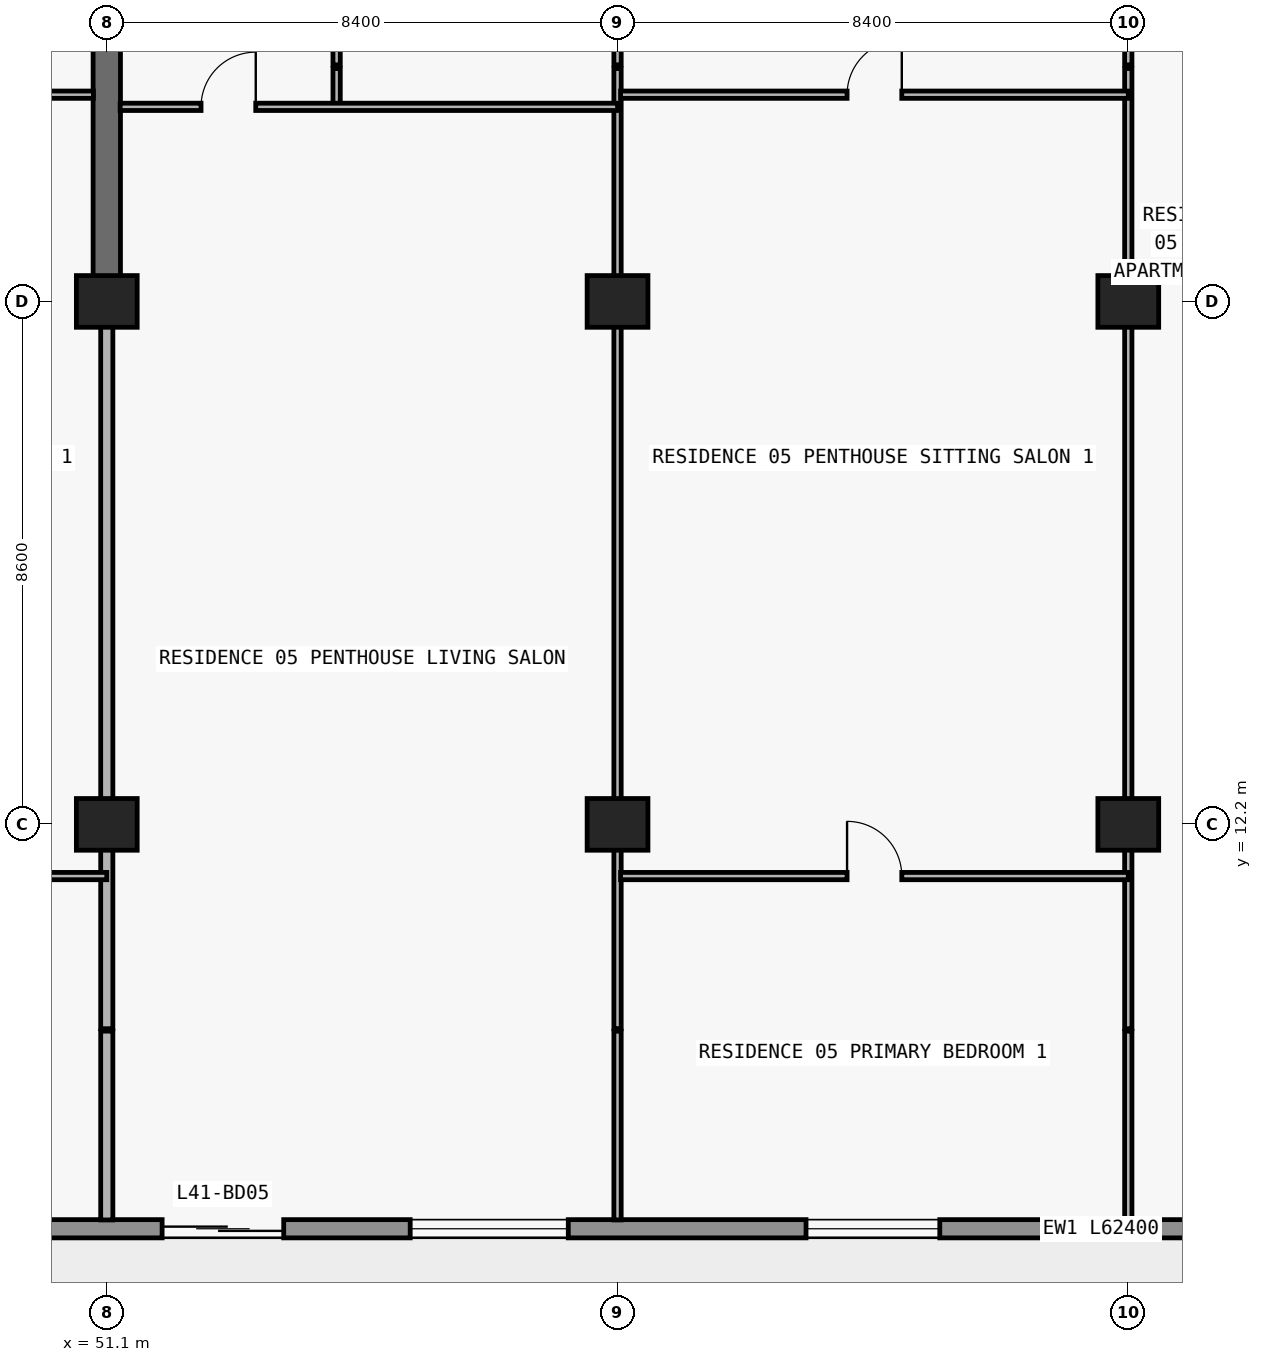
"""IFC4 building model, lengths in metres.
Left out: names, types, materials, properties, quantities, classifications, styles, units other than length and angle.
Written with IfcOpenShell. Run it as: python <this file> out.ifc"""

import sys

from ifc_helpers import new_model, si_unit, direction, frame, frame_2d, origin, origin_2d, place, context, subcontext, project, spatial, rectangle, extrude, element, fill, save


model = new_model("IFC4")
c1 = context("Model", 3, precision=1e-05, world=origin(), true_north=direction((0.0, 1.0)))
c2 = subcontext(c1, "Body", "Model", "MODEL_VIEW")
j1 = project(units=[si_unit("LENGTHUNIT", "METRE"), si_unit("PLANEANGLEUNIT", "RADIAN")], contexts=[c1])
p1 = place(None, origin())
s1 = spatial("IfcSite", under=j1, at=p1, CompositionType="ELEMENT")
p2 = place(p1, origin())
s2 = spatial("IfcBuilding", under=s1, at=p2, CompositionType="ELEMENT")
p3 = place(p2, frame((0.0, 0.0, 148.8)))
s3 = spatial("IfcBuildingStorey", under=s2, at=p3, CompositionType="ELEMENT", Elevation=148.8)
for number, where, z_axis, x_axis in (
    (1, (51.1, 12.2, 0.0), (0.0, 0.0, 1.0), (1.0, 0.0, 0.0)),
    (2, (59.5, 12.2, 0.0), (0.0, 0.0, 1.0), (1.0, 0.0, 0.0)),
    (3, (67.9, 12.2, 0.0), (0.0, 0.0, 1.0), (1.0, 0.0, 0.0)),
    (4, (51.1, 20.8, 0.0), (0.0, 0.0, 1.0), (1.0, 0.0, 0.0)),
    (5, (59.5, 20.8, 0.0), (0.0, 0.0, 1.0), (1.0, 0.0, 0.0)),
    (6, (67.9, 20.8, 0.0), (0.0, 0.0, 1.0), (1.0, 0.0, 0.0)),
):
    element("IfcColumn", number, at=place(p3, frame(where, z_axis=z_axis, x_axis=x_axis)), inside=s3, PredefinedType="COLUMN", context=c2, shape_type="SweptSolid", body=[
        extrude(rectangle(XDim=1.0, YDim=0.85, at=origin_2d()), origin(), (0.0, 0.0, 1.0), 3.0),
    ])
p4 = place(p3, frame((51.1, 20.8, 0.0), z_axis=(0.0, 0.0, 1.0), x_axis=(0.0, 1.0, 0.0)))
e7 = element("IfcWall", 7, at=p4, inside=s3, PredefinedType="SHEAR", context=c2, shape_type="SweptSolid", body=[
    extrude(rectangle(XDim=8.6, YDim=0.45, at=frame_2d((4.3, 0.0))), origin(), (0.0, 0.0, 1.0), 3.0),
])
p5 = place(p3, frame((70.1, 5.55, 0.0), z_axis=(0.0, 0.0, 1.0), x_axis=(-1.0, 0.0, 0.0)))
e8 = element("IfcWall", 8, at=p5, inside=s3, PredefinedType="STANDARD", context=c2, shape_type="SweptSolid", body=[
    extrude(rectangle(XDim=62.4, YDim=0.3, at=frame_2d((31.2, 0.0))), origin(), (0.0, 0.0, 1.0), 3.0),
])
p6 = place(p5, frame((57.226, 0.0, 0.0)))
e9 = element("IfcOpeningElement", 9, at=p6, cuts=e8, PredefinedType="OPENING", context=c2, shape_type="SweptSolid", body=[
    extrude(rectangle(XDim=2.0, YDim=2.3, at=frame_2d((1.0, 1.15))), frame((0.0, 0.16, 0.0), z_axis=(0.0, -1.0, 0.0), x_axis=(1.0, 0.0, 0.0)), (0.0, 0.0, 1.0), 0.32),
])
p7 = place(p5, frame((52.926, 0.0, 0.85)))
e10 = element("IfcOpeningElement", 10, at=p7, cuts=e8, PredefinedType="OPENING", context=c2, shape_type="SweptSolid", body=[
    extrude(rectangle(XDim=2.2, YDim=1.55, at=frame_2d((1.1, 0.775))), frame((0.0, 0.16, 0.0), z_axis=(0.0, -1.0, 0.0), x_axis=(1.0, 0.0, 0.0)), (0.0, 0.0, 1.0), 0.32),
])
p8 = place(p5, frame((48.49, 0.0, 0.0)))
e11 = element("IfcOpeningElement", 11, at=p8, cuts=e8, PredefinedType="OPENING", context=c2, shape_type="SweptSolid", body=[
    extrude(rectangle(XDim=2.0, YDim=2.3, at=frame_2d((1.0, 1.15))), frame((0.0, 0.16, 0.0), z_axis=(0.0, -1.0, 0.0), x_axis=(1.0, 0.0, 0.0)), (0.0, 0.0, 1.0), 0.32),
])
p9 = place(p5, frame((44.39, 0.0, 0.85)))
e12 = element("IfcOpeningElement", 12, at=p9, cuts=e8, PredefinedType="OPENING", context=c2, shape_type="SweptSolid", body=[
    extrude(rectangle(XDim=1.8, YDim=1.55, at=frame_2d((0.9, 0.775))), frame((0.0, 0.16, 0.0), z_axis=(0.0, -1.0, 0.0), x_axis=(1.0, 0.0, 0.0)), (0.0, 0.0, 1.0), 0.32),
])
p10 = place(p5, frame((40.426, 0.0, 0.0)))
e13 = element("IfcOpeningElement", 13, at=p10, cuts=e8, PredefinedType="OPENING", context=c2, shape_type="SweptSolid", body=[
    extrude(rectangle(XDim=2.0, YDim=2.3, at=frame_2d((1.0, 1.15))), frame((0.0, 0.16, 0.0), z_axis=(0.0, -1.0, 0.0), x_axis=(1.0, 0.0, 0.0)), (0.0, 0.0, 1.0), 0.32),
])
p11 = place(p5, frame((36.126, 0.0, 0.85)))
e14 = element("IfcOpeningElement", 14, at=p11, cuts=e8, PredefinedType="OPENING", context=c2, shape_type="SweptSolid", body=[
    extrude(rectangle(XDim=2.2, YDim=1.55, at=frame_2d((1.1, 0.775))), frame((0.0, 0.16, 0.0), z_axis=(0.0, -1.0, 0.0), x_axis=(1.0, 0.0, 0.0)), (0.0, 0.0, 1.0), 0.32),
])
p12 = place(p5, frame((32.09, 0.0, 0.0)))
e15 = element("IfcOpeningElement", 15, at=p12, cuts=e8, PredefinedType="OPENING", context=c2, shape_type="SweptSolid", body=[
    extrude(rectangle(XDim=2.0, YDim=2.3, at=frame_2d((1.0, 1.15))), frame((0.0, 0.16, 0.0), z_axis=(0.0, -1.0, 0.0), x_axis=(1.0, 0.0, 0.0)), (0.0, 0.0, 1.0), 0.32),
])
p13 = place(p5, frame((28.21, 0.0, 0.65)))
e16 = element("IfcOpeningElement", 16, at=p13, cuts=e8, PredefinedType="OPENING", context=c2, shape_type="SweptSolid", body=[
    extrude(rectangle(XDim=2.6, YDim=1.85, at=frame_2d((1.3, 0.925))), frame((0.0, 0.16, 0.0), z_axis=(0.0, -1.0, 0.0), x_axis=(1.0, 0.0, 0.0)), (0.0, 0.0, 1.0), 0.32),
])
p14 = place(p5, frame((22.1, 0.0, 0.85)))
e17 = element("IfcOpeningElement", 17, at=p14, cuts=e8, PredefinedType="OPENING", context=c2, shape_type="SweptSolid", body=[
    extrude(rectangle(XDim=2.2, YDim=1.55, at=frame_2d((1.1, 0.775))), frame((0.0, 0.16, 0.0), z_axis=(0.0, -1.0, 0.0), x_axis=(1.0, 0.0, 0.0)), (0.0, 0.0, 1.0), 0.32),
])
p15 = place(p5, frame((16.09, 0.0, 0.0)))
e18 = element("IfcOpeningElement", 18, at=p15, cuts=e8, PredefinedType="OPENING", context=c2, shape_type="SweptSolid", body=[
    extrude(rectangle(XDim=2.0, YDim=2.3, at=frame_2d((1.0, 1.15))), frame((0.0, 0.16, 0.0), z_axis=(0.0, -1.0, 0.0), x_axis=(1.0, 0.0, 0.0)), (0.0, 0.0, 1.0), 0.32),
])
p16 = place(p5, frame((11.41, 0.0, 0.65)))
e19 = element("IfcOpeningElement", 19, at=p16, cuts=e8, PredefinedType="OPENING", context=c2, shape_type="SweptSolid", body=[
    extrude(rectangle(XDim=2.6, YDim=1.85, at=frame_2d((1.3, 0.925))), frame((0.0, 0.16, 0.0), z_axis=(0.0, -1.0, 0.0), x_axis=(1.0, 0.0, 0.0)), (0.0, 0.0, 1.0), 0.32),
])
p17 = place(p5, frame((5.3, 0.0, 0.85)))
e20 = element("IfcOpeningElement", 20, at=p17, cuts=e8, PredefinedType="OPENING", context=c2, shape_type="SweptSolid", body=[
    extrude(rectangle(XDim=2.2, YDim=1.55, at=frame_2d((1.1, 0.775))), frame((0.0, 0.16, 0.0), z_axis=(0.0, -1.0, 0.0), x_axis=(1.0, 0.0, 0.0)), (0.0, 0.0, 1.0), 0.32),
])
p18 = place(p3, frame((51.1, 5.695, 0.0), z_axis=(0.0, 0.0, 1.0), x_axis=(0.0, 1.0, 0.0)))
e21 = element("IfcWall", 21, at=p18, inside=s3, PredefinedType="PARTITIONING", context=c2, shape_type="SweptSolid", body=[
    extrude(rectangle(XDim=3.105, YDim=0.2, at=frame_2d((1.552, 0.0))), origin(), (0.0, 0.0, 1.0), 3.0),
])
p19 = place(p3, frame((51.1, 8.84, 0.0), z_axis=(0.0, 0.0, 1.0), x_axis=(0.0, 1.0, 0.0)))
e22 = element("IfcWall", 22, at=p19, inside=s3, PredefinedType="PARTITIONING", context=c2, shape_type="SweptSolid", body=[
    extrude(rectangle(XDim=11.955, YDim=0.2, at=frame_2d((5.978, 0.0))), origin(), (0.0, 0.0, 1.0), 2.124),
])
p20 = place(p3, frame((54.88, 24.0, 0.0), z_axis=(0.0, 0.0, 1.0), x_axis=(0.0, 1.0, 0.0)))
e23 = element("IfcWall", 23, at=p20, inside=s3, PredefinedType="PARTITIONING", context=c2, shape_type="SweptSolid", body=[
    extrude(rectangle(XDim=0.63, YDim=0.12, at=frame_2d((0.315, 0.0))), origin(), (0.0, 0.0, 1.0), 3.0),
])
p21 = place(p3, frame((54.88, 24.69, 0.0), z_axis=(0.0, 0.0, 1.0), x_axis=(0.0, 1.0, 0.0)))
e24 = element("IfcWall", 24, at=p21, inside=s3, PredefinedType="PARTITIONING", context=c2, shape_type="SweptSolid", body=[
    extrude(rectangle(XDim=4.11, YDim=0.12, at=frame_2d((2.055, 0.0))), origin(), (0.0, 0.0, 1.0), 3.0),
])
p22 = place(p21, frame((1.605, 0.0, 0.0)))
e25 = element("IfcOpeningElement", 25, at=p22, cuts=e24, PredefinedType="OPENING", context=c2, shape_type="SweptSolid", body=[
    extrude(rectangle(XDim=0.9, YDim=2.15, at=frame_2d((0.45, 1.075))), frame((0.0, 0.07, 0.0), z_axis=(0.0, -1.0, 0.0), x_axis=(1.0, 0.0, 0.0)), (0.0, 0.0, 1.0), 0.14),
])
p23 = place(p3, frame((59.5, 5.695, 0.0), z_axis=(0.0, 0.0, 1.0), x_axis=(0.0, 1.0, 0.0)))
e26 = element("IfcWall", 26, at=p23, inside=s3, PredefinedType="PARTITIONING", context=c2, shape_type="SweptSolid", body=[
    extrude(rectangle(XDim=3.105, YDim=0.12, at=frame_2d((1.552, 0.0))), origin(), (0.0, 0.0, 1.0), 3.0),
])
p24 = place(p3, frame((59.5, 8.84, 0.0), z_axis=(0.0, 0.0, 1.0), x_axis=(0.0, 1.0, 0.0)))
e27 = element("IfcWall", 27, at=p24, inside=s3, PredefinedType="PARTITIONING", context=c2, shape_type="SweptSolid", body=[
    extrude(rectangle(XDim=15.79, YDim=0.12, at=frame_2d((7.895, 0.0))), origin(), (0.0, 0.0, 1.0), 2.124),
])
p25 = place(p3, frame((59.5, 24.69, 0.0), z_axis=(0.0, 0.0, 1.0), x_axis=(0.0, 1.0, 0.0)))
e28 = element("IfcWall", 28, at=p25, inside=s3, PredefinedType="PARTITIONING", context=c2, shape_type="SweptSolid", body=[
    extrude(rectangle(XDim=5.09, YDim=0.12, at=frame_2d((2.545, 0.0))), origin(), (0.0, 0.0, 1.0), 2.124),
])
p26 = place(p25, frame((1.505, 0.0, 0.0)))
e29 = element("IfcOpeningElement", 29, at=p26, cuts=e28, PredefinedType="OPENING", context=c2, shape_type="SweptSolid", body=[
    extrude(rectangle(XDim=0.9, YDim=2.074, at=frame_2d((0.45, 1.037))), frame((0.0, 0.07, 0.0), z_axis=(0.0, -1.0, 0.0), x_axis=(1.0, 0.0, 0.0)), (0.0, 0.0, 1.0), 0.14),
])
p27 = place(p3, frame((67.9, 5.695, 0.0), z_axis=(0.0, 0.0, 1.0), x_axis=(0.0, 1.0, 0.0)))
e30 = element("IfcWall", 30, at=p27, inside=s3, PredefinedType="PARTITIONING", context=c2, shape_type="SweptSolid", body=[
    extrude(rectangle(XDim=3.105, YDim=0.12, at=frame_2d((1.552, 0.0))), origin(), (0.0, 0.0, 1.0), 3.0),
])
p28 = place(p3, frame((67.9, 8.84, 0.0), z_axis=(0.0, 0.0, 1.0), x_axis=(0.0, 1.0, 0.0)))
e31 = element("IfcWall", 31, at=p28, inside=s3, PredefinedType="PARTITIONING", context=c2, shape_type="SweptSolid", body=[
    extrude(rectangle(XDim=15.79, YDim=0.12, at=frame_2d((7.895, 0.0))), origin(), (0.0, 0.0, 1.0), 2.124),
])
p29 = place(p3, frame((67.9, 24.69, 0.0), z_axis=(0.0, 0.0, 1.0), x_axis=(0.0, 1.0, 0.0)))
e32 = element("IfcWall", 32, at=p29, inside=s3, PredefinedType="PARTITIONING", context=c2, shape_type="SweptSolid", body=[
    extrude(rectangle(XDim=5.09, YDim=0.12, at=frame_2d((2.545, 0.0))), origin(), (0.0, 0.0, 1.0), 2.124),
])
p30 = place(p29, frame((1.505, 0.0, 0.0)))
e33 = element("IfcOpeningElement", 33, at=p30, cuts=e32, PredefinedType="OPENING", context=c2, shape_type="SweptSolid", body=[
    extrude(rectangle(XDim=0.9, YDim=2.074, at=frame_2d((0.45, 1.037))), frame((0.0, 0.07, 0.0), z_axis=(0.0, -1.0, 0.0), x_axis=(1.0, 0.0, 0.0)), (0.0, 0.0, 1.0), 0.14),
])
p31 = place(p3, frame((42.7, 11.35, 0.0), z_axis=(0.0, 0.0, 1.0), x_axis=(1.0, 0.0, 0.0)))
e34 = element("IfcWall", 34, at=p31, inside=s3, PredefinedType="PARTITIONING", context=c2, shape_type="SweptSolid", body=[
    extrude(rectangle(XDim=8.4, YDim=0.12, at=frame_2d((4.2, 0.0))), origin(), (0.0, 0.0, 1.0), 3.0),
])
p32 = place(p31, frame((3.75, 0.0, 0.0)))
e35 = element("IfcOpeningElement", 35, at=p32, cuts=e34, PredefinedType="OPENING", context=c2, shape_type="SweptSolid", body=[
    extrude(rectangle(XDim=0.9, YDim=2.15, at=frame_2d((0.45, 1.075))), frame((0.0, 0.07, 0.0), z_axis=(0.0, -1.0, 0.0), x_axis=(1.0, 0.0, 0.0)), (0.0, 0.0, 1.0), 0.14),
])
p33 = place(p3, frame((59.55, 11.35, 0.0), z_axis=(0.0, 0.0, 1.0), x_axis=(1.0, 0.0, 0.0)))
e36 = element("IfcWall", 36, at=p33, inside=s3, PredefinedType="PARTITIONING", context=c2, shape_type="SweptSolid", body=[
    extrude(rectangle(XDim=8.35, YDim=0.12, at=frame_2d((4.175, 0.0))), origin(), (0.0, 0.0, 1.0), 3.0),
])
p34 = place(p33, frame((3.725, 0.0, 0.0)))
e37 = element("IfcOpeningElement", 37, at=p34, cuts=e36, PredefinedType="OPENING", context=c2, shape_type="SweptSolid", body=[
    extrude(rectangle(XDim=0.9, YDim=2.15, at=frame_2d((0.45, 1.075))), frame((0.0, 0.07, 0.0), z_axis=(0.0, -1.0, 0.0), x_axis=(1.0, 0.0, 0.0)), (0.0, 0.0, 1.0), 0.14),
])
p35 = place(p3, frame((51.32, 24.0, 0.0), z_axis=(0.0, 0.0, 1.0), x_axis=(1.0, 0.0, 0.0)))
e38 = element("IfcWall", 38, at=p35, inside=s3, PredefinedType="PARTITIONING", context=c2, shape_type="SweptSolid", body=[
    extrude(rectangle(XDim=8.18, YDim=0.12, at=frame_2d((4.09, 0.0))), origin(), (0.0, 0.0, 1.0), 3.0),
])
p36 = place(p35, frame((1.33, 0.0, 0.0)))
e39 = element("IfcOpeningElement", 39, at=p36, cuts=e38, PredefinedType="OPENING", context=c2, shape_type="SweptSolid", body=[
    extrude(rectangle(XDim=0.9, YDim=2.15, at=frame_2d((0.45, 1.075))), frame((0.0, 0.07, 0.0), z_axis=(0.0, -1.0, 0.0), x_axis=(1.0, 0.0, 0.0)), (0.0, 0.0, 1.0), 0.14),
])
p37 = place(p3, frame((42.705, 24.2, 0.0), z_axis=(0.0, 0.0, 1.0), x_axis=(1.0, 0.0, 0.0)))
e40 = element("IfcWall", 40, at=p37, inside=s3, PredefinedType="PARTITIONING", context=c2, shape_type="SweptSolid", body=[
    extrude(rectangle(XDim=8.175, YDim=0.12, at=frame_2d((4.087, 0.0))), origin(), (0.0, 0.0, 1.0), 3.0),
])
p38 = place(p37, frame((3.637, 0.0, 0.0)))
e41 = element("IfcOpeningElement", 41, at=p38, cuts=e40, PredefinedType="OPENING", context=c2, shape_type="SweptSolid", body=[
    extrude(rectangle(XDim=0.9, YDim=2.15, at=frame_2d((0.45, 1.075))), frame((0.0, 0.07, 0.0), z_axis=(0.0, -1.0, 0.0), x_axis=(1.0, 0.0, 0.0)), (0.0, 0.0, 1.0), 0.14),
])
p39 = place(p3, frame((59.55, 24.2, 0.0), z_axis=(0.0, 0.0, 1.0), x_axis=(1.0, 0.0, 0.0)))
e42 = element("IfcWall", 42, at=p39, inside=s3, PredefinedType="PARTITIONING", context=c2, shape_type="SweptSolid", body=[
    extrude(rectangle(XDim=8.35, YDim=0.12, at=frame_2d((4.175, 0.0))), origin(), (0.0, 0.0, 1.0), 3.0),
])
p40 = place(p39, frame((3.725, 0.0, 0.0)))
e43 = element("IfcOpeningElement", 43, at=p40, cuts=e42, PredefinedType="OPENING", context=c2, shape_type="SweptSolid", body=[
    extrude(rectangle(XDim=0.9, YDim=2.15, at=frame_2d((0.45, 1.075))), frame((0.0, 0.07, 0.0), z_axis=(0.0, -1.0, 0.0), x_axis=(1.0, 0.0, 0.0)), (0.0, 0.0, 1.0), 0.14),
])
p41 = place(p15, origin())
e44 = element("IfcDoor", 44, at=p41, inside=s3, OperationType="DOUBLE_DOOR_SLIDING", PredefinedType="DOOR", context=c2, shape_type="SweptSolid", body=[
    extrude(rectangle(XDim=2.0, YDim=2.3, at=frame_2d((1.0, 1.15))), frame((0.0, 0.025, 0.0), z_axis=(0.0, -1.0, 0.0), x_axis=(1.0, 0.0, 0.0)), (0.0, 0.0, 1.0), 0.05),
])
fill(e18, e44)
p42 = place(p16, origin())
e45 = element("IfcWindow", 45, at=p42, inside=s3, PartitioningType="SINGLE_PANEL", PredefinedType="WINDOW", context=c2, shape_type="SweptSolid", body=[
    extrude(rectangle(XDim=2.6, YDim=1.85, at=frame_2d((1.3, 0.925))), frame((0.0, 0.03, 0.0), z_axis=(0.0, -1.0, 0.0), x_axis=(1.0, 0.0, 0.0)), (0.0, 0.0, 1.0), 0.06),
])
fill(e19, e45)
p43 = place(p17, origin())
e46 = element("IfcWindow", 46, at=p43, inside=s3, PartitioningType="SINGLE_PANEL", PredefinedType="WINDOW", context=c2, shape_type="SweptSolid", body=[
    extrude(rectangle(XDim=2.2, YDim=1.55, at=frame_2d((1.1, 0.775))), frame((0.0, 0.03, 0.0), z_axis=(0.0, -1.0, 0.0), x_axis=(1.0, 0.0, 0.0)), (0.0, 0.0, 1.0), 0.06),
])
fill(e20, e46)
p44 = place(p36, origin())
e47 = element("IfcDoor", 47, at=p44, inside=s3, OperationType="SINGLE_SWING_RIGHT", PredefinedType="DOOR", context=c2, shape_type="SweptSolid", body=[
    extrude(rectangle(XDim=0.9, YDim=2.15, at=frame_2d((0.45, 1.075))), frame((0.0, 0.025, 0.0), z_axis=(0.0, -1.0, 0.0), x_axis=(1.0, 0.0, 0.0)), (0.0, 0.0, 1.0), 0.05),
])
fill(e39, e47)
p45 = place(p40, origin())
e48 = element("IfcDoor", 48, at=p45, inside=s3, OperationType="SINGLE_SWING_RIGHT", PredefinedType="DOOR", context=c2, shape_type="SweptSolid", body=[
    extrude(rectangle(XDim=0.9, YDim=2.15, at=frame_2d((0.45, 1.075))), frame((0.0, 0.025, 0.0), z_axis=(0.0, -1.0, 0.0), x_axis=(1.0, 0.0, 0.0)), (0.0, 0.0, 1.0), 0.05),
])
fill(e43, e48)
p46 = place(p34, origin())
e49 = element("IfcDoor", 49, at=p46, inside=s3, OperationType="SINGLE_SWING_LEFT", PredefinedType="DOOR", context=c2, shape_type="SweptSolid", body=[
    extrude(rectangle(XDim=0.9, YDim=2.15, at=frame_2d((0.45, 1.075))), frame((0.0, 0.025, 0.0), z_axis=(0.0, -1.0, 0.0), x_axis=(1.0, 0.0, 0.0)), (0.0, 0.0, 1.0), 0.05),
])
fill(e37, e49)
save(model, sys.argv[1])
